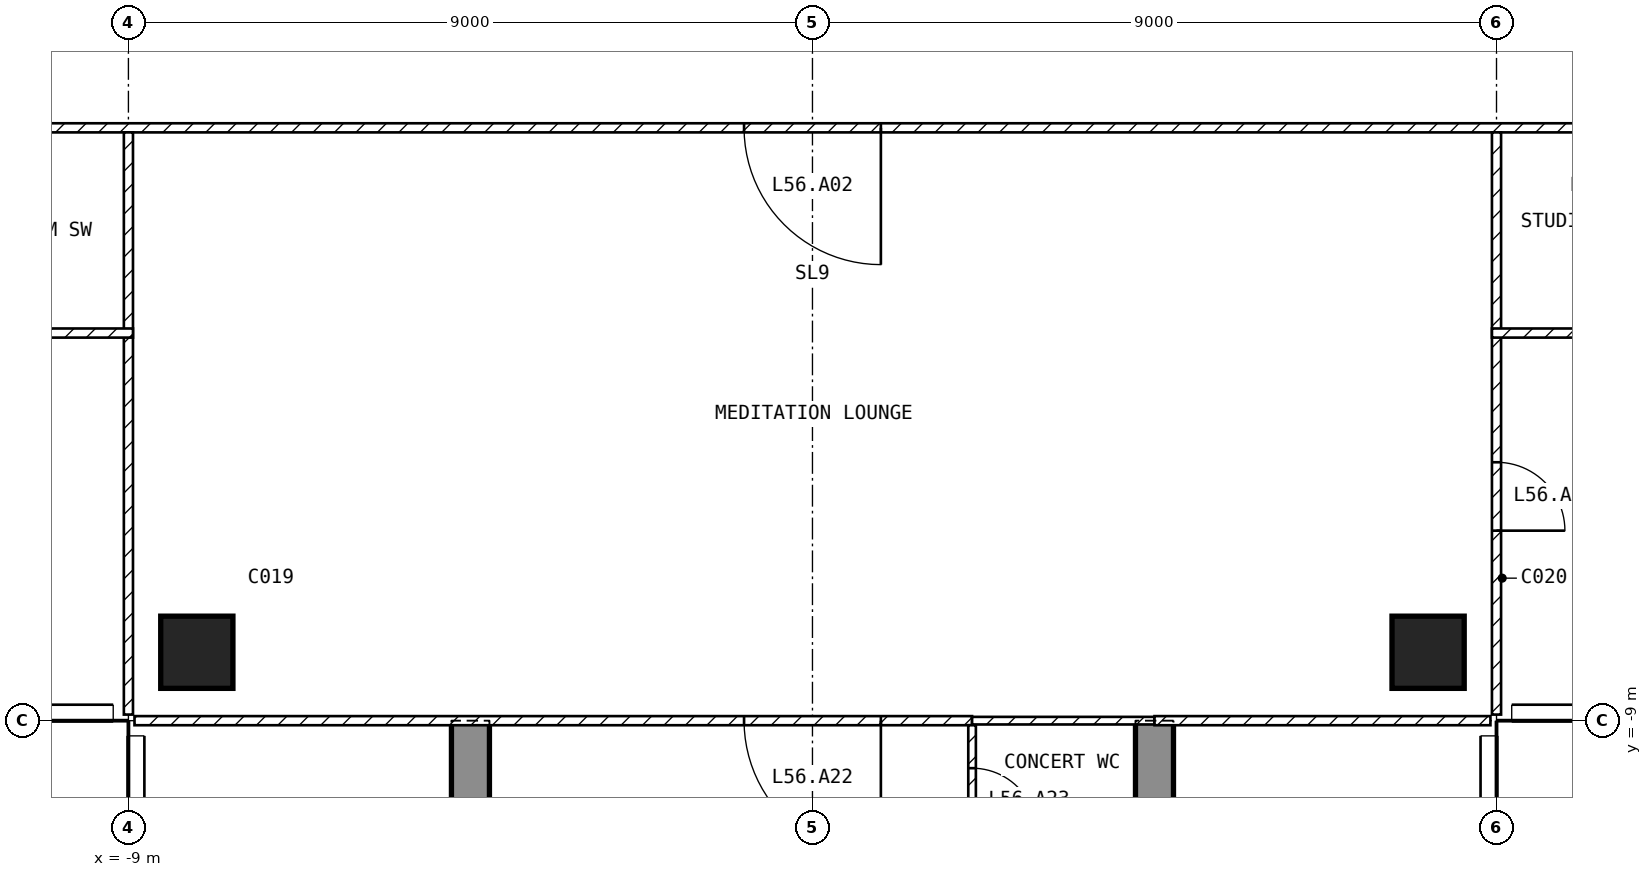
"""IFC4 building model, lengths in metres.
Left out: names, types, materials, properties, quantities, classifications, styles, units other than length and angle.
Written with IfcOpenShell. Run it as: python <this file> out.ifc"""

import sys

from ifc_helpers import new_model, si_unit, direction, frame, frame_2d, origin, origin_2d, place, context, subcontext, project, spatial, polyline, rectangle, outline, extrude, element, fill, save


model = new_model("IFC4")
c1 = context("Model", 3, precision=1e-05, world=origin(), true_north=direction((0.0, 1.0)))
c2 = subcontext(c1, "Body", "Model", "MODEL_VIEW")
j1 = project(units=[si_unit("LENGTHUNIT", "METRE"), si_unit("PLANEANGLEUNIT", "RADIAN")], contexts=[c1])
p1 = place(None, origin())
s1 = spatial("IfcSite", under=j1, at=p1, CompositionType="ELEMENT")
p2 = place(p1, origin())
s2 = spatial("IfcBuilding", under=s1, at=p2, CompositionType="ELEMENT")
p3 = place(p2, frame((0.0, 0.0, 222.6)))
s3 = spatial("IfcBuildingStorey", under=s2, at=p3, CompositionType="ELEMENT", Elevation=222.6)
for number, where, z_axis, x_axis in (
    (1, (-8.1, -8.1, -0.3), (0.0, 0.0, 1.0), (1.0, 0.0, 0.0)),
    (2, (8.1, -8.1, -0.3), (0.0, 0.0, 1.0), (1.0, 0.0, 0.0)),
):
    element("IfcColumn", number, at=place(p3, frame(where, z_axis=z_axis, x_axis=x_axis)), inside=s3, PredefinedType="COLUMN", context=c2, shape_type="SweptSolid", body=[
        extrude(rectangle(XDim=0.95, YDim=0.95, at=origin_2d()), origin(), (0.0, 0.0, 1.0), 5.25),
    ])
for number, where, z_axis, x_axis in (
    (3, (-4.75, -20.225, -0.3), (1.0, 0.0, 0.0), (0.0, 1.0, 0.0)),
    (4, (4.25, -20.225, -0.3), (1.0, 0.0, 0.0), (0.0, 1.0, 0.0)),
):
    element("IfcWall", number, at=place(p3, frame(where, z_axis=z_axis, x_axis=x_axis)), inside=s3, PredefinedType="SHEAR", context=c2, shape_type="SweptSolid", body=[
        extrude(outline(polyline([(0.0, 0.0), (6.725, 0.0), (6.725, 2.7), (9.125, 2.7), (9.125, 0.0), (11.225, 0.0), (11.225, 5.25), (0.0, 5.25), (0.0, 0.0)])), origin(), (0.0, 0.0, 1.0), 0.5),
    ])
p4 = place(p3, frame((14.4, -1.2, 0.0), z_axis=(0.0, 0.0, 1.0), x_axis=(-1.0, 0.0, 0.0)))
e5 = element("IfcWall", 5, at=p4, inside=s3, PredefinedType="PARTITIONING", context=c2, shape_type="SweptSolid", body=[
    extrude(rectangle(XDim=32.4, YDim=0.12, at=frame_2d((16.2, 0.0))), origin(), (0.0, 0.0, 1.0), 4.95),
])
p5 = place(p4, frame((13.5, 0.0, 0.0)))
e6 = element("IfcOpeningElement", 6, at=p5, cuts=e5, PredefinedType="OPENING", context=c2, shape_type="SweptSolid", body=[
    extrude(rectangle(XDim=1.8, YDim=2.1, at=frame_2d((0.9, 1.05))), frame((0.0, 0.07, 0.0), z_axis=(0.0, -1.0, 0.0), x_axis=(1.0, 0.0, 0.0)), (0.0, 0.0, 1.0), 0.14),
])
p6 = place(p4, frame((3.45, 0.0, 0.0)))
e7 = element("IfcOpeningElement", 7, at=p6, cuts=e5, PredefinedType="OPENING", context=c2, shape_type="SweptSolid", body=[
    extrude(rectangle(XDim=0.9, YDim=2.1, at=frame_2d((0.45, 1.05))), frame((0.0, 0.07, 0.0), z_axis=(0.0, -1.0, 0.0), x_axis=(1.0, 0.0, 0.0)), (0.0, 0.0, 1.0), 0.14),
])
p7 = place(p4, frame((29.25, 0.0, 0.0)))
e8 = element("IfcOpeningElement", 8, at=p7, cuts=e5, PredefinedType="OPENING", context=c2, shape_type="SweptSolid", body=[
    extrude(rectangle(XDim=0.9, YDim=2.1, at=frame_2d((0.45, 1.05))), frame((0.0, 0.07, 0.0), z_axis=(0.0, -1.0, 0.0), x_axis=(1.0, 0.0, 0.0)), (0.0, 0.0, 1.0), 0.14),
])
p8 = place(p3, frame((9.0, -1.26, 0.0), z_axis=(0.0, 0.0, 1.0), x_axis=(0.0, -1.0, 0.0)))
e9 = element("IfcWall", 9, at=p8, inside=s3, PredefinedType="PARTITIONING", context=c2, shape_type="SweptSolid", body=[
    extrude(rectangle(XDim=7.66, YDim=0.12, at=frame_2d((3.83, 0.0))), origin(), (0.0, 0.0, 1.0), 4.95),
])
p9 = place(p8, frame((4.34, 0.0, 0.0)))
e10 = element("IfcOpeningElement", 10, at=p9, cuts=e9, PredefinedType="OPENING", context=c2, shape_type="SweptSolid", body=[
    extrude(rectangle(XDim=0.9, YDim=2.1, at=frame_2d((0.45, 1.05))), frame((0.0, 0.07, 0.0), z_axis=(0.0, -1.0, 0.0), x_axis=(1.0, 0.0, 0.0)), (0.0, 0.0, 1.0), 0.14),
])
p10 = place(p3, frame((-9.0, -8.92, 0.0), z_axis=(0.0, 0.0, 1.0), x_axis=(0.0, 1.0, 0.0)))
e11 = element("IfcWall", 11, at=p10, inside=s3, PredefinedType="PARTITIONING", context=c2, shape_type="SweptSolid", body=[
    extrude(rectangle(XDim=7.66, YDim=0.12, at=frame_2d((3.83, 0.0))), origin(), (0.0, 0.0, 1.0), 4.95),
])
p11 = place(p3, frame((2.1, -9.0, 0.0), z_axis=(0.0, 0.0, 1.0), x_axis=(-1.0, 0.0, 0.0)))
e12 = element("IfcWall", 12, at=p11, inside=s3, PredefinedType="PARTITIONING", context=c2, shape_type="SweptSolid", body=[
    extrude(rectangle(XDim=11.02, YDim=0.12, at=frame_2d((5.51, 0.0))), origin(), (0.0, 0.0, 1.0), 4.95),
])
p12 = place(p11, frame((1.2, 0.0, 0.0)))
e13 = element("IfcOpeningElement", 13, at=p12, cuts=e12, PredefinedType="OPENING", context=c2, shape_type="SweptSolid", body=[
    extrude(rectangle(XDim=1.8, YDim=2.1, at=frame_2d((0.9, 1.05))), frame((0.0, 0.07, 0.0), z_axis=(0.0, -1.0, 0.0), x_axis=(1.0, 0.0, 0.0)), (0.0, 0.0, 1.0), 0.14),
])
p13 = place(p3, frame((4.5, -9.0, 0.0), z_axis=(0.0, 0.0, 1.0), x_axis=(-1.0, 0.0, 0.0)))
e14 = element("IfcWall", 14, at=p13, inside=s3, PredefinedType="PARTITIONING", context=c2, shape_type="SweptSolid", body=[
    extrude(rectangle(XDim=2.4, YDim=0.1, at=frame_2d((1.2, 0.0))), origin(), (0.0, 0.0, 1.0), 4.95),
])
p14 = place(p3, frame((8.92, -9.0, 0.0), z_axis=(0.0, 0.0, 1.0), x_axis=(-1.0, 0.0, 0.0)))
e15 = element("IfcWall", 15, at=p14, inside=s3, PredefinedType="PARTITIONING", context=c2, shape_type="SweptSolid", body=[
    extrude(rectangle(XDim=4.42, YDim=0.12, at=frame_2d((2.21, 0.0))), origin(), (0.0, 0.0, 1.0), 4.95),
])
p15 = place(p3, frame((8.94, -3.9, 0.0), z_axis=(0.0, 0.0, 1.0), x_axis=(1.0, 0.0, 0.0)))
e16 = element("IfcWall", 16, at=p15, inside=s3, PredefinedType="PARTITIONING", context=c2, shape_type="SweptSolid", body=[
    extrude(rectangle(XDim=5.46, YDim=0.12, at=frame_2d((2.73, 0.0))), origin(), (0.0, 0.0, 1.0), 4.95),
])
p16 = place(p3, frame((-18.0, -3.9, 0.0), z_axis=(0.0, 0.0, 1.0), x_axis=(1.0, 0.0, 0.0)))
e17 = element("IfcWall", 17, at=p16, inside=s3, PredefinedType="PARTITIONING", context=c2, shape_type="SweptSolid", body=[
    extrude(rectangle(XDim=9.06, YDim=0.12, at=frame_2d((4.53, 0.0))), origin(), (0.0, 0.0, 1.0), 4.95),
])
p17 = place(p16, frame((2.25, 0.0, 0.0)))
e18 = element("IfcOpeningElement", 18, at=p17, cuts=e17, PredefinedType="OPENING", context=c2, shape_type="SweptSolid", body=[
    extrude(rectangle(XDim=0.9, YDim=2.1, at=frame_2d((0.45, 1.05))), frame((0.0, 0.07, 0.0), z_axis=(0.0, -1.0, 0.0), x_axis=(1.0, 0.0, 0.0)), (0.0, 0.0, 1.0), 0.14),
])
p18 = place(p3, frame((2.1, -9.06, 0.0), z_axis=(0.0, 0.0, 1.0), x_axis=(0.0, -1.0, 0.0)))
e19 = element("IfcWall", 19, at=p18, inside=s3, PredefinedType="PARTITIONING", context=c2, shape_type="SweptSolid", body=[
    extrude(rectangle(XDim=1.98, YDim=0.1, at=frame_2d((0.99, 0.0))), origin(), (0.0, 0.0, 1.0), 4.95),
])
p19 = place(p18, frame((0.565, 0.0, 0.0)))
e20 = element("IfcOpeningElement", 20, at=p19, cuts=e19, PredefinedType="OPENING", context=c2, shape_type="SweptSolid", body=[
    extrude(rectangle(XDim=0.85, YDim=2.1, at=frame_2d((0.425, 1.05))), frame((0.0, 0.06, 0.0), z_axis=(0.0, -1.0, 0.0), x_axis=(1.0, 0.0, 0.0)), (0.0, 0.0, 1.0), 0.12),
])
p20 = place(p5, origin())
e21 = element("IfcDoor", 21, at=p20, inside=s3, OperationType="SINGLE_SWING_LEFT", PredefinedType="DOOR", context=c2, shape_type="SweptSolid", body=[
    extrude(rectangle(XDim=1.8, YDim=2.1, at=frame_2d((0.9, 1.05))), frame((0.0, 0.025, 0.0), z_axis=(0.0, -1.0, 0.0), x_axis=(1.0, 0.0, 0.0)), (0.0, 0.0, 1.0), 0.05),
])
fill(e6, e21)
p21 = place(p9, origin())
e22 = element("IfcDoor", 22, at=p21, inside=s3, OperationType="SINGLE_SWING_RIGHT", PredefinedType="DOOR", context=c2, shape_type="SweptSolid", body=[
    extrude(rectangle(XDim=0.9, YDim=2.1, at=frame_2d((0.45, 1.05))), frame((0.0, 0.025, 0.0), z_axis=(0.0, -1.0, 0.0), x_axis=(1.0, 0.0, 0.0)), (0.0, 0.0, 1.0), 0.05),
])
fill(e10, e22)
p22 = place(p12, origin())
e23 = element("IfcDoor", 23, at=p22, inside=s3, OperationType="SINGLE_SWING_LEFT", PredefinedType="DOOR", context=c2, shape_type="SweptSolid", body=[
    extrude(rectangle(XDim=1.8, YDim=2.1, at=frame_2d((0.9, 1.05))), frame((0.0, 0.025, 0.0), z_axis=(0.0, -1.0, 0.0), x_axis=(1.0, 0.0, 0.0)), (0.0, 0.0, 1.0), 0.05),
])
fill(e13, e23)
p23 = place(p19, origin())
e24 = element("IfcDoor", 24, at=p23, inside=s3, OperationType="SINGLE_SWING_RIGHT", PredefinedType="DOOR", context=c2, shape_type="SweptSolid", body=[
    extrude(rectangle(XDim=0.85, YDim=2.1, at=frame_2d((0.425, 1.05))), frame((0.0, 0.025, 0.0), z_axis=(0.0, -1.0, 0.0), x_axis=(1.0, 0.0, 0.0)), (0.0, 0.0, 1.0), 0.05),
])
fill(e20, e24)
save(model, sys.argv[1])
